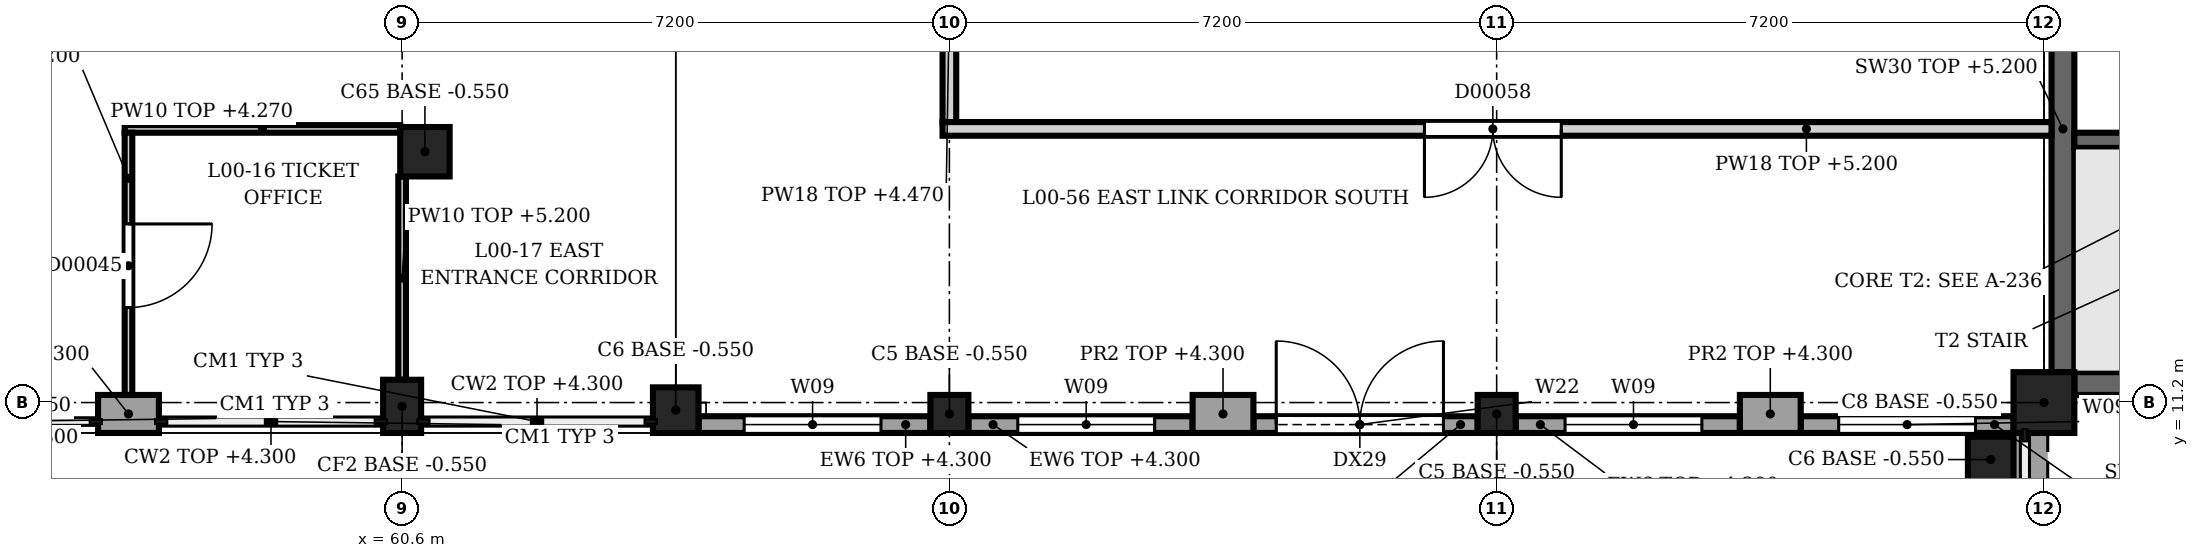
"""IFC4 building model, lengths in metres.
Left out: names, types, materials, properties, quantities, classifications, styles, units other than length and angle.
Written with IfcOpenShell. Run it as: python <this file> out.ifc"""

import sys

from ifc_helpers import new_model, si_unit, direction, frame, frame_2d, origin, origin_2d, place, context, subcontext, project, spatial, rectangle, extrude, element, fill, save


model = new_model("IFC4")
c1 = context("Model", 3, precision=1e-05, world=origin(), true_north=direction((0.0, 1.0)))
c2 = subcontext(c1, "Body", "Model", "MODEL_VIEW")
j1 = project(units=[si_unit("LENGTHUNIT", "METRE"), si_unit("PLANEANGLEUNIT", "RADIAN")], contexts=[c1])
p1 = place(None, origin())
s1 = spatial("IfcSite", under=j1, at=p1, CompositionType="ELEMENT")
p2 = place(p1, origin())
s2 = spatial("IfcBuilding", under=s1, at=p2, CompositionType="ELEMENT")
p3 = place(p2, origin())
s3 = spatial("IfcBuildingStorey", under=s2, at=p3, CompositionType="ELEMENT", Elevation=0.0)
p4 = place(p3, frame((82.2, 11.2, -0.55), z_axis=(0.0, 0.0, 1.0), x_axis=(1.0, 0.0, 0.0)))
e1 = element("IfcColumn", 1, at=p4, inside=s3, PredefinedType="COLUMN", context=c2, shape_type="SweptSolid", body=[
    extrude(rectangle(XDim=0.8, YDim=0.8, at=origin_2d()), origin(), (0.0, 0.0, 1.0), 5.95),
])
p5 = place(p3, frame((60.6, 11.15, -0.55), z_axis=(0.0, 0.0, 1.0), x_axis=(1.0, 0.0, 0.0)))
e2 = element("IfcColumn", 2, at=p5, inside=s3, PredefinedType="COLUMN", context=c2, shape_type="SweptSolid", body=[
    extrude(rectangle(XDim=0.5, YDim=0.7, at=origin_2d()), origin(), (0.0, 0.0, 1.0), 5.95),
])
p6 = place(p3, frame((64.2, 11.1, -0.55), z_axis=(0.0, 0.0, 1.0), x_axis=(1.0, 0.0, 0.0)))
e3 = element("IfcColumn", 3, at=p6, inside=s3, PredefinedType="COLUMN", context=c2, shape_type="SweptSolid", body=[
    extrude(rectangle(XDim=0.6, YDim=0.6, at=origin_2d()), origin(), (0.0, 0.0, 1.0), 5.95),
])
p7 = place(p3, frame((60.9, 14.5, -0.55), z_axis=(0.0, 0.0, 1.0), x_axis=(1.0, 0.0, 0.0)))
e4 = element("IfcColumn", 4, at=p7, inside=s3, PredefinedType="COLUMN", context=c2, shape_type="SweptSolid", body=[
    extrude(rectangle(XDim=0.65, YDim=0.65, at=origin_2d()), origin(), (0.0, 0.0, 1.0), 5.95),
])
for number, where, z_axis, x_axis in (
    (5, (67.8, 11.05, -0.55), (0.0, 0.0, 1.0), (1.0, 0.0, 0.0)),
    (6, (75.0, 11.05, -0.55), (0.0, 0.0, 1.0), (1.0, 0.0, 0.0)),
):
    element("IfcColumn", number, at=place(p3, frame(where, z_axis=z_axis, x_axis=x_axis)), inside=s3, PredefinedType="COLUMN", context=c2, shape_type="SweptSolid", body=[
        extrude(rectangle(XDim=0.5, YDim=0.5, at=origin_2d()), origin(), (0.0, 0.0, 1.0), 5.95),
    ])
p8 = place(p3, frame((81.5, 10.45, -0.55), z_axis=(0.0, 0.0, 1.0), x_axis=(1.0, 0.0, 0.0)))
e7 = element("IfcColumn", 7, at=p8, inside=s3, PredefinedType="COLUMN", context=c2, shape_type="SweptSolid", body=[
    extrude(rectangle(XDim=0.6, YDim=0.6, at=origin_2d()), origin(), (0.0, 0.0, 1.0), 5.95),
])
p9 = place(p3, frame((82.025, 8.0, 0.0), z_axis=(0.0, 0.0, 1.0), x_axis=(0.0, 1.0, 0.0)))
e8 = element("IfcWall", 8, at=p9, inside=s3, PredefinedType="SOLIDWALL", context=c2, shape_type="SweptSolid", body=[
    extrude(rectangle(XDim=2.8, YDim=0.45, at=frame_2d((1.4, 0.0))), origin(), (0.0, 0.0, 1.0), 0.9),
])
for number, where, z_axis, x_axis in (
    (9, (79.0, 11.05, 0.0), (0.0, 0.0, 1.0), (-1.0, 0.0, 0.0)),
    (10, (71.8, 11.05, 0.0), (0.0, 0.0, 1.0), (-1.0, 0.0, 0.0)),
):
    element("IfcWall", number, at=place(p3, frame(where, z_axis=z_axis, x_axis=x_axis)), inside=s3, PredefinedType="SOLIDWALL", context=c2, shape_type="SweptSolid", body=[
        extrude(rectangle(XDim=0.8, YDim=0.5, at=frame_2d((0.4, 0.0))), origin(), (0.0, 0.0, 1.0), 4.3),
    ])
p10 = place(p3, frame((81.8, 10.91, 0.0), z_axis=(0.0, 0.0, 1.0), x_axis=(-1.0, 0.0, 0.0)))
e11 = element("IfcWall", 11, at=p10, inside=s3, PredefinedType="SOLIDWALL", context=c2, shape_type="SweptSolid", body=[
    extrude(rectangle(XDim=2.8, YDim=0.22, at=frame_2d((1.4, 0.0))), origin(), (0.0, 0.0, 1.0), 4.3),
])
p11 = place(p10, frame((0.5, 0.0, 0.9)))
e12 = element("IfcOpeningElement", 12, at=p11, cuts=e11, PredefinedType="OPENING", context=c2, shape_type="SweptSolid", body=[
    extrude(rectangle(XDim=1.8, YDim=2.1, at=frame_2d((0.9, 1.05))), frame((0.0, 0.12, 0.0), z_axis=(0.0, -1.0, 0.0), x_axis=(1.0, 0.0, 0.0)), (0.0, 0.0, 1.0), 0.24),
])
p12 = place(p3, frame((78.2, 10.91, 0.0), z_axis=(0.0, 0.0, 1.0), x_axis=(-1.0, 0.0, 0.0)))
e13 = element("IfcWall", 13, at=p12, inside=s3, PredefinedType="SOLIDWALL", context=c2, shape_type="SweptSolid", body=[
    extrude(rectangle(XDim=2.95, YDim=0.22, at=frame_2d((1.475, 0.0))), origin(), (0.0, 0.0, 1.0), 4.3),
])
p13 = place(p12, frame((0.5, 0.0, 0.9)))
e14 = element("IfcOpeningElement", 14, at=p13, cuts=e13, PredefinedType="OPENING", context=c2, shape_type="SweptSolid", body=[
    extrude(rectangle(XDim=1.8, YDim=2.1, at=frame_2d((0.9, 1.05))), frame((0.0, 0.12, 0.0), z_axis=(0.0, -1.0, 0.0), x_axis=(1.0, 0.0, 0.0)), (0.0, 0.0, 1.0), 0.24),
])
p14 = place(p3, frame((74.75, 10.91, 0.0), z_axis=(0.0, 0.0, 1.0), x_axis=(-1.0, 0.0, 0.0)))
e15 = element("IfcWall", 15, at=p14, inside=s3, PredefinedType="SOLIDWALL", context=c2, shape_type="SweptSolid", body=[
    extrude(rectangle(XDim=2.95, YDim=0.22, at=frame_2d((1.475, 0.0))), origin(), (0.0, 0.0, 1.0), 4.3),
])
p15 = place(p14, frame((0.45, 0.0, 0.0)))
e16 = element("IfcOpeningElement", 16, at=p15, cuts=e15, PredefinedType="OPENING", context=c2, shape_type="SweptSolid", body=[
    extrude(rectangle(XDim=2.2, YDim=2.4, at=frame_2d((1.1, 1.2))), frame((0.0, 0.12, 0.0), z_axis=(0.0, -1.0, 0.0), x_axis=(1.0, 0.0, 0.0)), (0.0, 0.0, 1.0), 0.24),
])
p16 = place(p14, frame((0.45, 0.0, 2.5)))
e17 = element("IfcOpeningElement", 17, at=p16, cuts=e15, PredefinedType="OPENING", context=c2, shape_type="SweptSolid", body=[
    extrude(rectangle(XDim=2.2, YDim=0.45, at=frame_2d((1.1, 0.225))), frame((0.0, 0.12, 0.0), z_axis=(0.0, -1.0, 0.0), x_axis=(1.0, 0.0, 0.0)), (0.0, 0.0, 1.0), 0.24),
])
p17 = place(p3, frame((71.0, 10.91, 0.0), z_axis=(0.0, 0.0, 1.0), x_axis=(-1.0, 0.0, 0.0)))
e18 = element("IfcWall", 18, at=p17, inside=s3, PredefinedType="SOLIDWALL", context=c2, shape_type="SweptSolid", body=[
    extrude(rectangle(XDim=2.95, YDim=0.22, at=frame_2d((1.475, 0.0))), origin(), (0.0, 0.0, 1.0), 4.3),
])
p18 = place(p17, frame((0.5, 0.0, 0.9)))
e19 = element("IfcOpeningElement", 19, at=p18, cuts=e18, PredefinedType="OPENING", context=c2, shape_type="SweptSolid", body=[
    extrude(rectangle(XDim=1.8, YDim=2.1, at=frame_2d((0.9, 1.05))), frame((0.0, 0.12, 0.0), z_axis=(0.0, -1.0, 0.0), x_axis=(1.0, 0.0, 0.0)), (0.0, 0.0, 1.0), 0.24),
])
p19 = place(p3, frame((67.55, 10.91, 0.0), z_axis=(0.0, 0.0, 1.0), x_axis=(-1.0, 0.0, 0.0)))
e20 = element("IfcWall", 20, at=p19, inside=s3, PredefinedType="SOLIDWALL", context=c2, shape_type="SweptSolid", body=[
    extrude(rectangle(XDim=3.05, YDim=0.22, at=frame_2d((1.525, 0.0))), origin(), (0.0, 0.0, 1.0), 4.3),
])
p20 = place(p19, frame((0.65, 0.0, 0.9)))
e21 = element("IfcOpeningElement", 21, at=p20, cuts=e20, PredefinedType="OPENING", context=c2, shape_type="SweptSolid", body=[
    extrude(rectangle(XDim=1.8, YDim=2.1, at=frame_2d((0.9, 1.05))), frame((0.0, 0.12, 0.0), z_axis=(0.0, -1.0, 0.0), x_axis=(1.0, 0.0, 0.0)), (0.0, 0.0, 1.0), 0.24),
])
p21 = place(p3, frame((57.4, 11.05, 0.0), z_axis=(0.0, 0.0, 1.0), x_axis=(-1.0, 0.0, 0.0)))
e22 = element("IfcWall", 22, at=p21, inside=s3, PredefinedType="SOLIDWALL", context=c2, shape_type="SweptSolid", body=[
    extrude(rectangle(XDim=0.8, YDim=0.5, at=frame_2d((0.4, 0.0))), origin(), (0.0, 0.0, 1.0), 4.3),
])
for number, where, z_axis, x_axis in (
    (23, (82.45, 11.6, 0.0), (0.0, 0.0, 1.0), (0.0, 1.0, 0.0)),
    (24, (82.6, 11.45, 0.0), (0.0, 0.0, 1.0), (1.0, 0.0, 0.0)),
):
    element("IfcWall", number, at=place(p3, frame(where, z_axis=z_axis, x_axis=x_axis)), inside=s3, PredefinedType="SHEAR", context=c2, shape_type="SweptSolid", body=[
        extrude(rectangle(XDim=6.4, YDim=0.3, at=frame_2d((3.2, 0.0))), origin(), (0.0, 0.0, 1.0), 5.2),
    ])
p22 = place(p3, frame((82.6, 14.65, 0.0), z_axis=(0.0, 0.0, 1.0), x_axis=(1.0, 0.0, 0.0)))
e25 = element("IfcWall", 25, at=p22, inside=s3, PredefinedType="SHEAR", context=c2, shape_type="SweptSolid", body=[
    extrude(rectangle(XDim=6.4, YDim=0.2, at=frame_2d((3.2, 0.0))), origin(), (0.0, 0.0, 1.0), 5.2),
])
p23 = place(p22, frame((5.3, 0.0, 0.0)))
e26 = element("IfcOpeningElement", 26, at=p23, cuts=e25, PredefinedType="OPENING", context=c2, shape_type="SweptSolid", body=[
    extrude(rectangle(XDim=1.0, YDim=2.1, at=frame_2d((0.5, 1.05))), frame((0.0, 0.11, 0.0), z_axis=(0.0, -1.0, 0.0), x_axis=(1.0, 0.0, 0.0)), (0.0, 0.0, 1.0), 0.22),
])
p24 = place(p3, frame((56.95, 14.8, 0.0), z_axis=(0.0, 0.0, 1.0), x_axis=(1.0, 0.0, 0.0)))
e27 = element("IfcWall", 27, at=p24, inside=s3, PredefinedType="PARTITIONING", context=c2, shape_type="SweptSolid", body=[
    extrude(rectangle(XDim=3.625, YDim=0.1, at=frame_2d((1.812, 0.0))), origin(), (0.0, 0.0, 1.0), 4.27),
])
p25 = place(p3, frame((82.3, 14.8, 0.0), z_axis=(0.0, 0.0, 1.0), x_axis=(-1.0, 0.0, 0.0)))
e28 = element("IfcWall", 28, at=p25, inside=s3, PredefinedType="PARTITIONING", context=c2, shape_type="SweptSolid", body=[
    extrude(rectangle(XDim=14.59, YDim=0.18, at=frame_2d((7.295, 0.0))), origin(), (0.0, 0.0, 1.0), 5.2),
])
p26 = place(p25, frame((6.45, 0.0, 0.0)))
e29 = element("IfcOpeningElement", 29, at=p26, cuts=e28, PredefinedType="OPENING", context=c2, shape_type="SweptSolid", body=[
    extrude(rectangle(XDim=1.8, YDim=2.1, at=frame_2d((0.9, 1.05))), frame((0.0, 0.1, 0.0), z_axis=(0.0, -1.0, 0.0), x_axis=(1.0, 0.0, 0.0)), (0.0, 0.0, 1.0), 0.2),
])
p27 = place(p3, frame((57.0, 14.75, 0.0), z_axis=(0.0, 0.0, 1.0), x_axis=(0.0, -1.0, 0.0)))
e30 = element("IfcWall", 30, at=p27, inside=s3, PredefinedType="PARTITIONING", context=c2, shape_type="SweptSolid", body=[
    extrude(rectangle(XDim=3.45, YDim=0.1, at=frame_2d((1.725, 0.0))), origin(), (0.0, 0.0, 1.0), 5.2),
])
p28 = place(p27, frame((1.2, 0.0, 0.0)))
e31 = element("IfcOpeningElement", 31, at=p28, cuts=e30, PredefinedType="OPENING", context=c2, shape_type="SweptSolid", body=[
    extrude(rectangle(XDim=1.1, YDim=2.2, at=frame_2d((0.55, 1.1))), frame((0.0, 0.06, 0.0), z_axis=(0.0, -1.0, 0.0), x_axis=(1.0, 0.0, 0.0)), (0.0, 0.0, 1.0), 0.12),
])
p29 = place(p3, frame((60.6, 11.5, 0.0), z_axis=(0.0, 0.0, 1.0), x_axis=(0.0, 1.0, 0.0)))
e32 = element("IfcWall", 32, at=p29, inside=s3, PredefinedType="PARTITIONING", context=c2, shape_type="SweptSolid", body=[
    extrude(rectangle(XDim=2.675, YDim=0.1, at=frame_2d((1.337, 0.0))), origin(), (0.0, 0.0, 1.0), 5.2),
])
p30 = place(p3, frame((67.8, 14.89, 0.0), z_axis=(0.0, 0.0, 1.0), x_axis=(0.0, 1.0, 0.0)))
e33 = element("IfcWall", 33, at=p30, inside=s3, PredefinedType="PARTITIONING", context=c2, shape_type="SweptSolid", body=[
    extrude(rectangle(XDim=3.26, YDim=0.18, at=frame_2d((1.63, 0.0))), origin(), (0.0, 0.0, 1.0), 4.47),
])
p31 = place(p11, origin())
e34 = element("IfcWindow", 34, at=p31, inside=s3, PartitioningType="SINGLE_PANEL", PredefinedType="WINDOW", context=c2, shape_type="SweptSolid", body=[
    extrude(rectangle(XDim=1.8, YDim=2.1, at=frame_2d((0.9, 1.05))), frame((0.0, 0.03, 0.0), z_axis=(0.0, -1.0, 0.0), x_axis=(1.0, 0.0, 0.0)), (0.0, 0.0, 1.0), 0.06),
])
fill(e12, e34)
p32 = place(p13, origin())
e35 = element("IfcWindow", 35, at=p32, inside=s3, PartitioningType="SINGLE_PANEL", PredefinedType="WINDOW", context=c2, shape_type="SweptSolid", body=[
    extrude(rectangle(XDim=1.8, YDim=2.1, at=frame_2d((0.9, 1.05))), frame((0.0, 0.03, 0.0), z_axis=(0.0, -1.0, 0.0), x_axis=(1.0, 0.0, 0.0)), (0.0, 0.0, 1.0), 0.06),
])
fill(e14, e35)
p33 = place(p15, origin())
e36 = element("IfcDoor", 36, at=p33, inside=s3, OperationType="SINGLE_SWING_LEFT", PredefinedType="DOOR", context=c2, shape_type="SweptSolid", body=[
    extrude(rectangle(XDim=2.2, YDim=2.4, at=frame_2d((1.1, 1.2))), frame((0.0, 0.025, 0.0), z_axis=(0.0, -1.0, 0.0), x_axis=(1.0, 0.0, 0.0)), (0.0, 0.0, 1.0), 0.05),
])
fill(e16, e36)
p34 = place(p16, origin())
e37 = element("IfcWindow", 37, at=p34, inside=s3, PartitioningType="SINGLE_PANEL", PredefinedType="WINDOW", context=c2, shape_type="SweptSolid", body=[
    extrude(rectangle(XDim=2.2, YDim=0.45, at=frame_2d((1.1, 0.225))), frame((0.0, 0.03, 0.0), z_axis=(0.0, -1.0, 0.0), x_axis=(1.0, 0.0, 0.0)), (0.0, 0.0, 1.0), 0.06),
])
fill(e17, e37)
p35 = place(p18, origin())
e38 = element("IfcWindow", 38, at=p35, inside=s3, PartitioningType="SINGLE_PANEL", PredefinedType="WINDOW", context=c2, shape_type="SweptSolid", body=[
    extrude(rectangle(XDim=1.8, YDim=2.1, at=frame_2d((0.9, 1.05))), frame((0.0, 0.03, 0.0), z_axis=(0.0, -1.0, 0.0), x_axis=(1.0, 0.0, 0.0)), (0.0, 0.0, 1.0), 0.06),
])
fill(e19, e38)
p36 = place(p20, origin())
e39 = element("IfcWindow", 39, at=p36, inside=s3, PartitioningType="SINGLE_PANEL", PredefinedType="WINDOW", context=c2, shape_type="SweptSolid", body=[
    extrude(rectangle(XDim=1.8, YDim=2.1, at=frame_2d((0.9, 1.05))), frame((0.0, 0.03, 0.0), z_axis=(0.0, -1.0, 0.0), x_axis=(1.0, 0.0, 0.0)), (0.0, 0.0, 1.0), 0.06),
])
fill(e21, e39)
p37 = place(p26, origin())
e40 = element("IfcDoor", 40, at=p37, inside=s3, OperationType="SINGLE_SWING_LEFT", PredefinedType="DOOR", context=c2, shape_type="SweptSolid", body=[
    extrude(rectangle(XDim=1.8, YDim=2.1, at=frame_2d((0.9, 1.05))), frame((0.0, 0.025, 0.0), z_axis=(0.0, -1.0, 0.0), x_axis=(1.0, 0.0, 0.0)), (0.0, 0.0, 1.0), 0.05),
])
fill(e29, e40)
p38 = place(p28, origin())
e41 = element("IfcDoor", 41, at=p38, inside=s3, OperationType="SINGLE_SWING_RIGHT", PredefinedType="DOOR", context=c2, shape_type="SweptSolid", body=[
    extrude(rectangle(XDim=1.1, YDim=2.2, at=frame_2d((0.55, 1.1))), frame((0.0, 0.025, 0.0), z_axis=(0.0, -1.0, 0.0), x_axis=(1.0, 0.0, 0.0)), (0.0, 0.0, 1.0), 0.05),
])
fill(e31, e41)
save(model, sys.argv[1])
